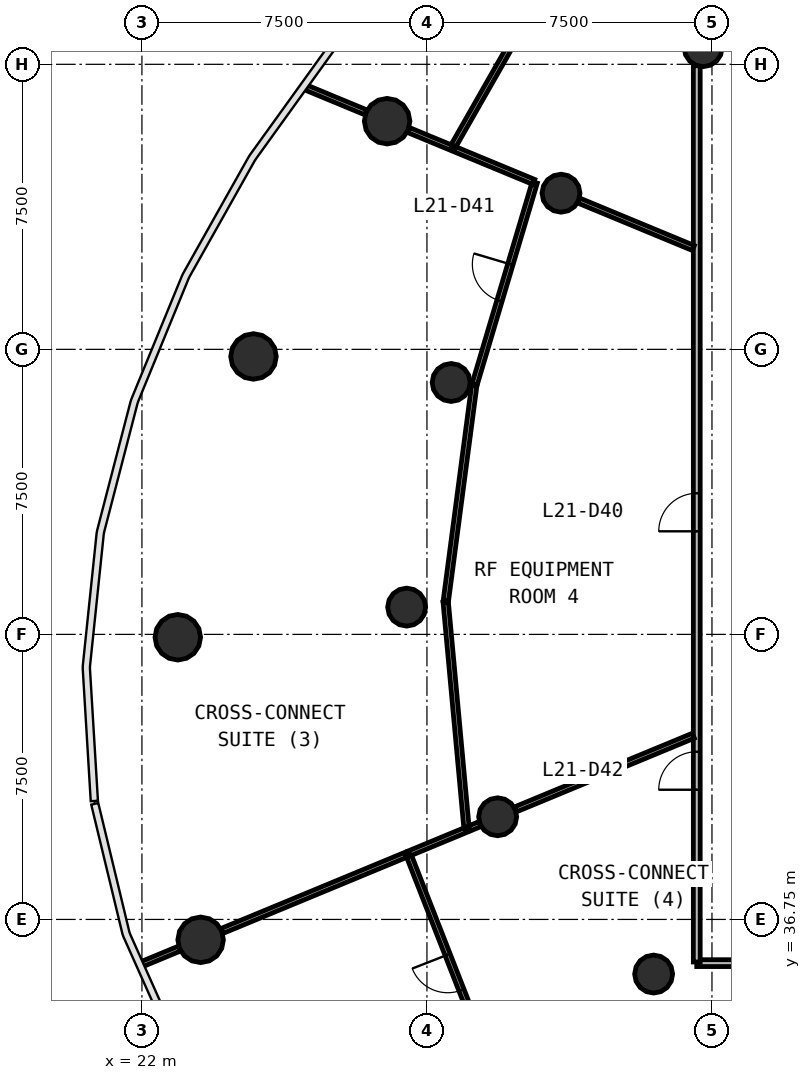
"""IFC4 building model, lengths in metres.
Left out: names, types, materials, properties, quantities, classifications, styles, units other than length and angle.
Written with IfcOpenShell. Run it as: python <this file> out.ifc"""

import sys

from ifc_helpers import new_model, si_unit, direction, frame, frame_2d, origin, origin_2d, place, context, subcontext, project, spatial, rectangle, circle, extrude, source, transform, mapped, element, fill, save


model = new_model("IFC4")
c1 = context("Model", 3, precision=1e-05, world=origin(), true_north=direction((0.0, 1.0)))
c2 = subcontext(c1, "Body", "Model", "MODEL_VIEW")
j1 = project(units=[si_unit("LENGTHUNIT", "METRE"), si_unit("PLANEANGLEUNIT", "RADIAN")], contexts=[c1])
p1 = place(None, origin())
s1 = spatial("IfcSite", under=j1, at=p1, CompositionType="ELEMENT")
p2 = place(p1, origin())
s2 = spatial("IfcBuilding", under=s1, at=p2, CompositionType="ELEMENT")
p3 = place(p2, frame((0.0, 0.0, 92.1)))
s3 = spatial("IfcBuildingStorey", under=s2, at=p3, CompositionType="ELEMENT", Elevation=92.1)
m1 = source(origin(), c2, "Body", "SweptSolid", [
    extrude(circle(Radius=0.6, at=origin_2d()), origin(), (0.0, 0.0, 1.0), 4.1),
])
for number, where, z_axis, x_axis in (
    (1, (28.452, 57.754, 0.0), (0.0, 0.0, 1.0), (1.0, 0.0, 0.0)),
    (2, (24.936, 51.563, 0.0), (0.0, 0.0, 1.0), (1.0, 0.0, 0.0)),
    (3, (22.944, 44.175, 0.0), (0.0, 0.0, 1.0), (1.0, 0.0, 0.0)),
    (4, (23.544, 36.213, 0.0), (0.0, 0.0, 1.0), (1.0, 0.0, 0.0)),
):
    element("IfcColumn", number, at=place(p3, frame(where, z_axis=z_axis, x_axis=x_axis)), inside=s3, PredefinedType="COLUMN", context=c2, shape_type="MappedRepresentation", body=[
        mapped(m1, transform((0.0, 0.0, 0.0), scale=1.0)),
    ])
m2 = source(origin(), c2, "Body", "SweptSolid", [
    extrude(circle(Radius=0.5, at=origin_2d()), origin(), (0.0, 0.0, 1.0), 4.1),
])
for number, where, z_axis, x_axis in (
    (5, (36.768, 59.688, 0.0), (0.0, 0.0, 1.0), (1.0, 0.0, 0.0)),
    (6, (33.028, 55.859, 0.0), (0.0, 0.0, 1.0), (1.0, 0.0, 0.0)),
    (7, (30.137, 50.878, 0.0), (0.0, 0.0, 1.0), (1.0, 0.0, 0.0)),
    (8, (28.966, 44.968, 0.0), (0.0, 0.0, 1.0), (1.0, 0.0, 0.0)),
    (9, (31.361, 39.451, 0.0), (0.0, 0.0, 1.0), (1.0, 0.0, 0.0)),
    (10, (35.465, 35.312, 0.0), (0.0, 0.0, 1.0), (1.0, 0.0, 0.0)),
):
    element("IfcColumn", number, at=place(p3, frame(where, z_axis=z_axis, x_axis=x_axis)), inside=s3, PredefinedType="COLUMN", context=c2, shape_type="MappedRepresentation", body=[
        mapped(m2, transform((0.0, 0.0, 0.0), scale=1.0)),
    ])
p4 = place(p3, frame((67.4, 35.6, 0.0), z_axis=(0.0, 0.0, 1.0), x_axis=(-1.0, 0.0, 0.0)))
e11 = element("IfcWall", 11, at=p4, inside=s3, PredefinedType="PARTITIONING", context=c2, shape_type="SweptSolid", body=[
    extrude(rectangle(XDim=30.8, YDim=0.18, at=frame_2d((15.4, 0.0))), origin(), (0.0, 0.0, 1.0), 2.9),
])
p5 = place(p4, frame((22.25, 0.0, 0.0)))
e12 = element("IfcOpeningElement", 12, at=p5, cuts=e11, PredefinedType="OPENING", context=c2, shape_type="SweptSolid", body=[
    extrude(rectangle(XDim=0.9, YDim=2.1, at=frame_2d((0.45, 1.05))), frame((0.0, 0.1, 0.0), z_axis=(0.0, -1.0, 0.0), x_axis=(1.0, 0.0, 0.0)), (0.0, 0.0, 1.0), 0.2),
])
p6 = place(p4, frame((19.65, 0.0, 0.0)))
e13 = element("IfcOpeningElement", 13, at=p6, cuts=e11, PredefinedType="OPENING", context=c2, shape_type="SweptSolid", body=[
    extrude(rectangle(XDim=0.9, YDim=2.1, at=frame_2d((0.45, 1.05))), frame((0.0, 0.1, 0.0), z_axis=(0.0, -1.0, 0.0), x_axis=(1.0, 0.0, 0.0)), (0.0, 0.0, 1.0), 0.2),
])
p7 = place(p4, frame((17.25, 0.0, 0.0)))
e14 = element("IfcOpeningElement", 14, at=p7, cuts=e11, PredefinedType="OPENING", context=c2, shape_type="SweptSolid", body=[
    extrude(rectangle(XDim=0.9, YDim=2.1, at=frame_2d((0.45, 1.05))), frame((0.0, 0.1, 0.0), z_axis=(0.0, -1.0, 0.0), x_axis=(1.0, 0.0, 0.0)), (0.0, 0.0, 1.0), 0.2),
])
p8 = place(p4, frame((14.95, 0.0, 0.0)))
e15 = element("IfcOpeningElement", 15, at=p8, cuts=e11, PredefinedType="OPENING", context=c2, shape_type="SweptSolid", body=[
    extrude(rectangle(XDim=1.0, YDim=2.1, at=frame_2d((0.5, 1.05))), frame((0.0, 0.1, 0.0), z_axis=(0.0, -1.0, 0.0), x_axis=(1.0, 0.0, 0.0)), (0.0, 0.0, 1.0), 0.2),
])
p9 = place(p4, frame((4.35, 0.0, 0.0)))
e16 = element("IfcOpeningElement", 16, at=p9, cuts=e11, PredefinedType="OPENING", context=c2, shape_type="SweptSolid", body=[
    extrude(rectangle(XDim=1.0, YDim=2.1, at=frame_2d((0.5, 1.05))), frame((0.0, 0.1, 0.0), z_axis=(0.0, -1.0, 0.0), x_axis=(1.0, 0.0, 0.0)), (0.0, 0.0, 1.0), 0.2),
])
p10 = place(p3, frame((36.6, 35.63, 0.0), z_axis=(0.0, 0.0, 1.0), x_axis=(0.0, 1.0, 0.0)))
e17 = element("IfcWall", 17, at=p10, inside=s3, PredefinedType="PARTITIONING", context=c2, shape_type="SweptSolid", body=[
    extrude(rectangle(XDim=23.583, YDim=0.18, at=frame_2d((11.791, 0.0))), origin(), (0.0, 0.0, 1.0), 2.9),
])
p11 = place(p10, frame((11.333, 0.0, 0.0)))
e18 = element("IfcOpeningElement", 18, at=p11, cuts=e17, PredefinedType="OPENING", context=c2, shape_type="SweptSolid", body=[
    extrude(rectangle(XDim=1.0, YDim=2.1, at=frame_2d((0.5, 1.05))), frame((0.0, 0.1, 0.0), z_axis=(0.0, -1.0, 0.0), x_axis=(1.0, 0.0, 0.0)), (0.0, 0.0, 1.0), 0.2),
])
p12 = place(p10, frame((4.532, 0.0, 0.0)))
e19 = element("IfcOpeningElement", 19, at=p12, cuts=e17, PredefinedType="OPENING", context=c2, shape_type="SweptSolid", body=[
    extrude(rectangle(XDim=1.0, YDim=2.1, at=frame_2d((0.5, 1.05))), frame((0.0, 0.1, 0.0), z_axis=(0.0, -1.0, 0.0), x_axis=(1.0, 0.0, 0.0)), (0.0, 0.0, 1.0), 0.2),
])
p13 = place(p3, frame((31.439, 32.259, 0.0), z_axis=(0.0, 0.0, 1.0), x_axis=(-0.364570341209, 0.931175851443, 0.0)))
e20 = element("IfcWall", 20, at=p13, inside=s3, PredefinedType="PARTITIONING", context=c2, shape_type="SweptSolid", body=[
    extrude(rectangle(XDim=6.675, YDim=0.14, at=frame_2d((3.338, 0.0))), origin(), (0.0, 0.0, 1.0), 2.9),
])
p14 = place(p13, frame((2.825, 0.0, 0.0)))
e21 = element("IfcOpeningElement", 21, at=p14, cuts=e20, PredefinedType="OPENING", context=c2, shape_type="SweptSolid", body=[
    extrude(rectangle(XDim=1.0, YDim=2.1, at=frame_2d((0.5, 1.05))), frame((0.0, 0.08, 0.0), z_axis=(0.0, -1.0, 0.0), x_axis=(1.0, 0.0, 0.0)), (0.0, 0.0, 1.0), 0.16),
])
p15 = place(p3, frame((29.993, 45.103, 0.0), z_axis=(0.0, 0.0, 1.0), x_axis=(0.091688453154, -0.995787742221, 0.0)))
e22 = element("IfcWall", 22, at=p15, inside=s3, PredefinedType="PARTITIONING", context=c2, shape_type="SweptSolid", body=[
    extrude(rectangle(XDim=6.015, YDim=0.14, at=frame_2d((3.008, 0.0))), origin(), (0.0, 0.0, 1.0), 2.9),
])
p16 = place(p3, frame((33.14, 62.263, 0.0), z_axis=(0.0, 0.0, 1.0), x_axis=(-0.495587358923, -0.868558098043, 0.0)))
e23 = element("IfcWall", 23, at=p16, inside=s3, PredefinedType="PARTITIONING", context=c2, shape_type="SweptSolid", body=[
    extrude(rectangle(XDim=6.007, YDim=0.14, at=frame_2d((3.003, 0.0))), origin(), (0.0, 0.0, 1.0), 2.9),
])
p17 = place(p3, frame((30.744, 50.798, 0.0), z_axis=(0.0, 0.0, 1.0), x_axis=(-0.130725256145, -0.99141863378, 0.0)))
e24 = element("IfcWall", 24, at=p17, inside=s3, PredefinedType="PARTITIONING", context=c2, shape_type="SweptSolid", body=[
    extrude(rectangle(XDim=5.715, YDim=0.14, at=frame_2d((2.857, 0.0))), origin(), (0.0, 0.0, 1.0), 2.9),
])
p18 = place(p3, frame((30.753, 50.827, 0.0), z_axis=(0.0, 0.0, 1.0), x_axis=(0.28557117519, 0.95835750318, 0.0)))
e25 = element("IfcWall", 25, at=p18, inside=s3, PredefinedType="PARTITIONING", context=c2, shape_type="SweptSolid", body=[
    extrude(rectangle(XDim=5.548, YDim=0.14, at=frame_2d((2.774, 0.0))), origin(), (0.0, 0.0, 1.0), 2.9),
])
p19 = place(p18, frame((2.299, 0.0, 0.0)))
e26 = element("IfcOpeningElement", 26, at=p19, cuts=e25, PredefinedType="OPENING", context=c2, shape_type="SweptSolid", body=[
    extrude(rectangle(XDim=1.0, YDim=2.1, at=frame_2d((0.5, 1.05))), frame((0.0, 0.08, 0.0), z_axis=(0.0, -1.0, 0.0), x_axis=(1.0, 0.0, 0.0)), (0.0, 0.0, 1.0), 0.16),
])
p20 = place(p3, frame((28.94, 38.448, 0.0), z_axis=(0.0, 0.0, 1.0), x_axis=(-0.923869625223, -0.382707349798, 0.0)))
e27 = element("IfcWall", 27, at=p20, inside=s3, PredefinedType="PARTITIONING", context=c2, shape_type="SweptSolid", body=[
    extrude(rectangle(XDim=5.236, YDim=0.14, at=frame_2d((2.618, 0.0))), origin(), (0.0, 0.0, 1.0), 2.9),
])
p21 = place(p3, frame((36.51, 41.584, 0.0), z_axis=(0.0, 0.0, 1.0), x_axis=(-0.923890025086, -0.382658100067, 0.0)))
e28 = element("IfcWall", 28, at=p21, inside=s3, PredefinedType="PARTITIONING", context=c2, shape_type="SweptSolid", body=[
    extrude(rectangle(XDim=5.068, YDim=0.14, at=frame_2d((2.534, 0.0))), origin(), (0.0, 0.0, 1.0), 2.9),
])
p22 = place(p3, frame((36.51, 54.416, 0.0), z_axis=(0.0, 0.0, 1.0), x_axis=(-0.923911109142, 0.382607190737, 0.0)))
e29 = element("IfcWall", 29, at=p22, inside=s3, PredefinedType="PARTITIONING", context=c2, shape_type="SweptSolid", body=[
    extrude(rectangle(XDim=3.264, YDim=0.14, at=frame_2d((1.632, 0.0))), origin(), (0.0, 0.0, 1.0), 2.9),
])
p23 = place(p3, frame((32.31, 56.156, 0.0), z_axis=(0.0, 0.0, 1.0), x_axis=(-0.923901937079, 0.382629338474, 0.0)))
e30 = element("IfcWall", 30, at=p23, inside=s3, PredefinedType="PARTITIONING", context=c2, shape_type="SweptSolid", body=[
    extrude(rectangle(XDim=2.253, YDim=0.14, at=frame_2d((1.126, 0.0))), origin(), (0.0, 0.0, 1.0), 2.9),
])
p24 = place(p3, frame((27.893, 57.985, 0.0), z_axis=(0.0, 0.0, 1.0), x_axis=(-0.92390514321, 0.382621596816, 0.0)))
e31 = element("IfcWall", 31, at=p24, inside=s3, PredefinedType="PARTITIONING", context=c2, shape_type="SweptSolid", body=[
    extrude(rectangle(XDim=1.705, YDim=0.14, at=frame_2d((0.853, 0.0))), origin(), (0.0, 0.0, 1.0), 2.9),
])
p25 = place(p3, frame((30.517, 39.102, 0.0), z_axis=(0.0, 0.0, 1.0), x_axis=(-0.923924255361, -0.382575444006, 0.0)))
e32 = element("IfcWall", 32, at=p25, inside=s3, PredefinedType="PARTITIONING", context=c2, shape_type="SweptSolid", body=[
    extrude(rectangle(XDim=1.607, YDim=0.14, at=frame_2d((0.803, 0.0))), origin(), (0.0, 0.0, 1.0), 2.9),
])
p26 = place(p3, frame((30.135, 57.057, 0.0), z_axis=(0.0, 0.0, 1.0), x_axis=(-0.923911694708, 0.382605776723, 0.0)))
e33 = element("IfcWall", 33, at=p26, inside=s3, PredefinedType="PARTITIONING", context=c2, shape_type="SweptSolid", body=[
    extrude(rectangle(XDim=1.217, YDim=0.14, at=frame_2d((0.608, 0.0))), origin(), (0.0, 0.0, 1.0), 2.9),
])
p27 = place(p3, frame((22.986, 35.982, 0.0), z_axis=(0.0, 0.0, 1.0), x_axis=(-0.923936411435, -0.382546085621, 0.0)))
e34 = element("IfcWall", 34, at=p27, inside=s3, PredefinedType="PARTITIONING", context=c2, shape_type="SweptSolid", body=[
    extrude(rectangle(XDim=1.073, YDim=0.14, at=frame_2d((0.536, 0.0))), origin(), (0.0, 0.0, 1.0), 2.9),
])
p28 = place(p3, frame((30.894, 39.258, 0.0), z_axis=(0.0, 0.0, 1.0), x_axis=(-0.923645219799, -0.383248624188, 0.0)))
e35 = element("IfcWall", 35, at=p28, inside=s3, PredefinedType="PARTITIONING", context=c2, shape_type="SweptSolid", body=[
    extrude(rectangle(XDim=0.304, YDim=0.14, at=frame_2d((0.152, 0.0))), origin(), (0.0, 0.0, 1.0), 2.9),
])
m3 = source(origin(), c2, "Body", "SweptSolid", [
    extrude(rectangle(XDim=1.0, YDim=2.1, at=frame_2d((0.5, 1.05))), frame((0.0, 0.025, 0.0), z_axis=(0.0, -1.0, 0.0), x_axis=(1.0, 0.0, 0.0)), (0.0, 0.0, 1.0), 0.05),
])
p29 = place(p11, origin())
e36 = element("IfcDoor", 36, at=p29, inside=s3, OperationType="SINGLE_SWING_LEFT", PredefinedType="DOOR", context=c2, shape_type="MappedRepresentation", body=[
    mapped(m3, transform((0.0, 0.0, 0.0), scale=1.0)),
])
fill(e18, e36)
p30 = place(p19, origin())
e37 = element("IfcDoor", 37, at=p30, inside=s3, OperationType="SINGLE_SWING_RIGHT", PredefinedType="DOOR", context=c2, shape_type="MappedRepresentation", body=[
    mapped(m3, transform((0.0, 0.0, 0.0), scale=1.0)),
])
fill(e26, e37)
p31 = place(p12, origin())
e38 = element("IfcDoor", 38, at=p31, inside=s3, OperationType="SINGLE_SWING_LEFT", PredefinedType="DOOR", context=c2, shape_type="MappedRepresentation", body=[
    mapped(m3, transform((0.0, 0.0, 0.0), scale=1.0)),
])
fill(e19, e38)
p32 = place(p14, origin())
e39 = element("IfcDoor", 39, at=p32, inside=s3, OperationType="SINGLE_SWING_RIGHT", PredefinedType="DOOR", context=c2, shape_type="MappedRepresentation", body=[
    mapped(m3, transform((0.0, 0.0, 0.0), scale=1.0)),
])
fill(e21, e39)
save(model, sys.argv[1])
